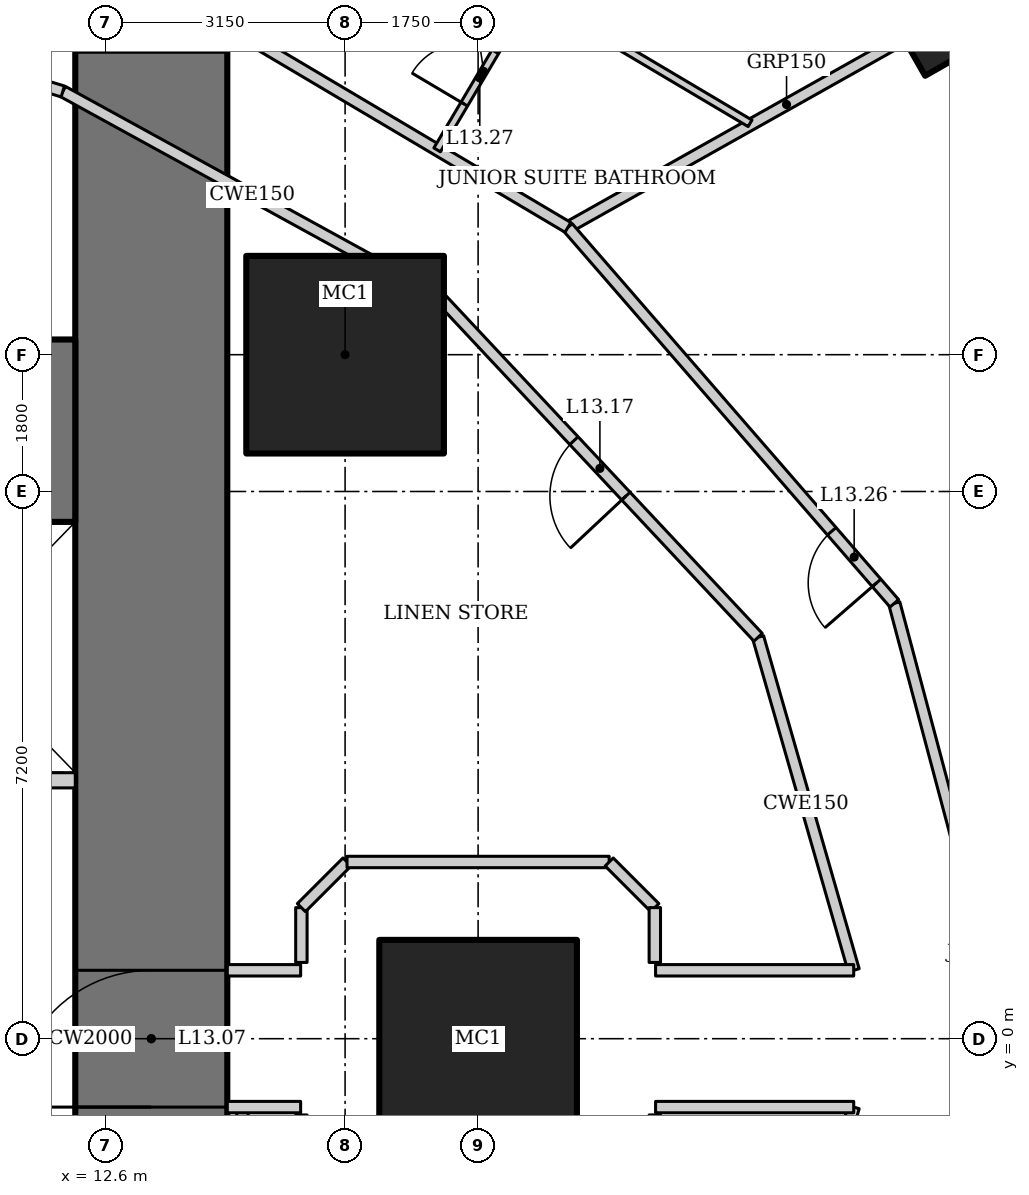
"""IFC4 building model, lengths in metres.
Left out: names, types, materials, properties, quantities, classifications, styles, units other than length and angle.
Written with IfcOpenShell. Run it as: python <this file> out.ifc"""

import sys

from ifc_helpers import new_model, si_unit, direction, frame, frame_2d, origin, origin_2d, place, context, subcontext, project, spatial, rectangle, hollow_rectangle, extrude, element, fill, save


model = new_model("IFC4")
c1 = context("Model", 3, precision=1e-05, world=origin(), true_north=direction((0.0, 1.0)))
c2 = subcontext(c1, "Body", "Model", "MODEL_VIEW")
j1 = project(units=[si_unit("LENGTHUNIT", "METRE"), si_unit("PLANEANGLEUNIT", "RADIAN")], contexts=[c1])
p1 = place(None, origin())
s1 = spatial("IfcSite", under=j1, at=p1, CompositionType="ELEMENT")
p2 = place(p1, origin())
s2 = spatial("IfcBuilding", under=s1, at=p2, CompositionType="ELEMENT")
p3 = place(p2, frame((0.0, 0.0, 62.2)))
s3 = spatial("IfcBuildingStorey", under=s2, at=p3, CompositionType="ELEMENT", Elevation=62.2)
for number, where, z_axis, x_axis in (
    (1, (17.5, 0.0, 0.0), (0.0, 0.0, 1.0), (1.0, 0.0, 0.0)),
    (2, (15.75, 9.0, 0.0), (0.0, 0.0, 1.0), (1.0, 0.0, 0.0)),
):
    element("IfcColumn", number, at=place(p3, frame(where, z_axis=z_axis, x_axis=x_axis)), inside=s3, PredefinedType="COLUMN", context=c2, shape_type="SweptSolid", body=[
        extrude(hollow_rectangle(XDim=2.6, YDim=2.6, WallThickness=0.13, at=origin_2d()), origin(), (0.0, 0.0, 1.0), 3.6),
    ])
p4 = place(p3, frame((23.605, 13.489, 0.0), z_axis=(0.0, 0.0, 1.0), x_axis=(0.86824298017, 0.496139221777, 0.0)))
e3 = element("IfcColumn", 3, at=p4, inside=s3, PredefinedType="COLUMN", context=c2, shape_type="SweptSolid", body=[
    extrude(hollow_rectangle(XDim=1.2, YDim=1.2, WallThickness=0.12, at=origin_2d()), origin(), (0.0, 0.0, 1.0), 3.6),
])
p5 = place(p3, frame((13.2, -13.0, 0.0), z_axis=(0.0, 0.0, 1.0), x_axis=(0.0, 1.0, 0.0)))
e4 = element("IfcWall", 4, at=p5, inside=s3, PredefinedType="SHEAR", context=c2, shape_type="SweptSolid", body=[
    extrude(rectangle(XDim=26.0, YDim=2.0, at=frame_2d((13.0, 0.0))), origin(), (0.0, 0.0, 1.0), 3.6),
])
p6 = place(p5, frame((12.1, 0.0, 0.0)))
e5 = element("IfcOpeningElement", 5, at=p6, cuts=e4, PredefinedType="OPENING", context=c2, shape_type="SweptSolid", body=[
    extrude(rectangle(XDim=1.8, YDim=2.1, at=frame_2d((0.9, 1.05))), frame((0.0, 1.01, 0.0), z_axis=(0.0, -1.0, 0.0), x_axis=(1.0, 0.0, 0.0)), (0.0, 0.0, 1.0), 2.02),
])
p7 = place(p3, frame((12.2, 8.0, 0.0), z_axis=(0.0, 0.0, 1.0), x_axis=(-1.0, 0.0, 0.0)))
e6 = element("IfcWall", 6, at=p7, inside=s3, PredefinedType="SHEAR", context=c2, shape_type="SweptSolid", body=[
    extrude(rectangle(XDim=24.4, YDim=2.4, at=frame_2d((12.2, 0.0))), origin(), (0.0, 0.0, 1.0), 3.6),
])
p8 = place(p3, frame((12.2, 3.4, 0.0), z_axis=(0.0, 0.0, 1.0), x_axis=(-1.0, 0.0, 0.0)))
e7 = element("IfcWall", 7, at=p8, inside=s3, PredefinedType="SOLIDWALL", context=c2, shape_type="SweptSolid", body=[
    extrude(rectangle(XDim=6.6, YDim=0.2, at=frame_2d((3.3, 0.0))), origin(), (0.0, 0.0, 1.0), 3.6),
])
p9 = place(p8, frame((4.45, 0.0, 0.0)))
e8 = element("IfcOpeningElement", 8, at=p9, cuts=e7, PredefinedType="OPENING", context=c2, shape_type="SweptSolid", body=[
    extrude(rectangle(XDim=1.1, YDim=2.2, at=frame_2d((0.55, 1.1))), frame((0.0, 0.11, 0.0), z_axis=(0.0, -1.0, 0.0), x_axis=(1.0, 0.0, 0.0)), (0.0, 0.0, 1.0), 0.22),
])
p10 = place(p8, frame((0.9, 0.0, 0.0)))
e9 = element("IfcOpeningElement", 9, at=p10, cuts=e7, PredefinedType="OPENING", context=c2, shape_type="SweptSolid", body=[
    extrude(rectangle(XDim=1.4, YDim=2.2, at=frame_2d((0.7, 1.1))), frame((0.0, 0.11, 0.0), z_axis=(0.0, -1.0, 0.0), x_axis=(1.0, 0.0, 0.0)), (0.0, 0.0, 1.0), 0.22),
])
p11 = place(p3, frame((24.435, 13.909, 0.0), z_axis=(0.0, 0.0, 1.0), x_axis=(-0.871747379892, -0.489955616001, 0.0)))
e10 = element("IfcWall", 10, at=p11, inside=s3, PredefinedType="PARTITIONING", context=c2, shape_type="SweptSolid", body=[
    extrude(rectangle(XDim=6.6, YDim=0.15, at=frame_2d((3.3, 0.0))), origin(), (0.0, 0.0, 1.0), 2.693),
])
p12 = place(p3, frame((24.5, 0.0, 0.0), z_axis=(0.0, 0.0, 1.0), x_axis=(-0.257083265334, 0.966389256296, 0.0)))
e11 = element("IfcWall", 11, at=p12, inside=s3, PredefinedType="PARTITIONING", context=c2, shape_type="SweptSolid", body=[
    extrude(rectangle(XDim=5.928, YDim=0.15, at=frame_2d((2.964, 0.0))), origin(), (0.0, 0.0, 1.0), 3.45),
])
p13 = place(p3, frame((22.976, 5.729, 0.0), z_axis=(0.0, 0.0, 1.0), x_axis=(-0.655599989166, 0.755108372491, 0.0)))
e12 = element("IfcWall", 12, at=p13, inside=s3, PredefinedType="PARTITIONING", context=c2, shape_type="SweptSolid", body=[
    extrude(rectangle(XDim=6.551, YDim=0.15, at=frame_2d((3.275, 0.0))), origin(), (0.0, 0.0, 1.0), 3.45),
])
p14 = place(p13, frame((0.356, 0.0, 0.0)))
e13 = element("IfcOpeningElement", 13, at=p14, cuts=e12, PredefinedType="OPENING", context=c2, shape_type="SweptSolid", body=[
    extrude(rectangle(XDim=0.9, YDim=2.1, at=frame_2d((0.45, 1.05))), frame((0.0, 0.085, 0.0), z_axis=(0.0, -1.0, 0.0), x_axis=(1.0, 0.0, 0.0)), (0.0, 0.0, 1.0), 0.17),
])
p15 = place(p3, frame((18.681, 10.675, 0.0), z_axis=(0.0, 0.0, 1.0), x_axis=(-0.860147339762, 0.510045639036, 0.0)))
e14 = element("IfcWall", 14, at=p15, inside=s3, PredefinedType="PARTITIONING", context=c2, shape_type="SweptSolid", body=[
    extrude(rectangle(XDim=6.19, YDim=0.15, at=frame_2d((3.095, 0.0))), origin(), (0.0, 0.0, 1.0), 3.45),
])
p16 = place(p3, frame((22.976, -5.729, 0.0), z_axis=(0.0, 0.0, 1.0), x_axis=(0.257083265334, 0.966389256296, 0.0)))
e15 = element("IfcWall", 15, at=p16, inside=s3, PredefinedType="PARTITIONING", context=c2, shape_type="SweptSolid", body=[
    extrude(rectangle(XDim=5.928, YDim=0.15, at=frame_2d((2.964, 0.0))), origin(), (0.0, 0.0, 1.0), 3.45),
])
p17 = place(p16, frame((1.794, 0.0, 0.0)))
e16 = element("IfcOpeningElement", 16, at=p17, cuts=e15, PredefinedType="OPENING", context=c2, shape_type="SweptSolid", body=[
    extrude(rectangle(XDim=0.9, YDim=2.1, at=frame_2d((0.45, 1.05))), frame((0.0, 0.085, 0.0), z_axis=(0.0, -1.0, 0.0), x_axis=(1.0, 0.0, 0.0)), (0.0, 0.0, 1.0), 0.17),
])
p18 = place(p3, frame((22.442, 0.9, 0.0), z_axis=(0.0, 0.0, 1.0), x_axis=(-0.27585972825, 0.961197903831, 0.0)))
e17 = element("IfcWall", 17, at=p18, inside=s3, PredefinedType="PARTITIONING", context=c2, shape_type="SweptSolid", body=[
    extrude(rectangle(XDim=4.559, YDim=0.15, at=frame_2d((2.279, 0.0))), origin(), (0.0, 0.0, 1.0), 3.45),
])
p19 = place(p3, frame((21.184, 5.282, 0.0), z_axis=(0.0, 0.0, 1.0), x_axis=(-0.68365836236, 0.729802194828, 0.0)))
e18 = element("IfcWall", 18, at=p19, inside=s3, PredefinedType="PARTITIONING", context=c2, shape_type="SweptSolid", body=[
    extrude(rectangle(XDim=6.09, YDim=0.15, at=frame_2d((3.045, 0.0))), origin(), (0.0, 0.0, 1.0), 3.45),
])
p20 = place(p19, frame((2.545, 0.0, 0.0)))
e19 = element("IfcOpeningElement", 19, at=p20, cuts=e18, PredefinedType="OPENING", context=c2, shape_type="SweptSolid", body=[
    extrude(rectangle(XDim=1.0, YDim=2.1, at=frame_2d((0.5, 1.05))), frame((0.0, 0.085, 0.0), z_axis=(0.0, -1.0, 0.0), x_axis=(1.0, 0.0, 0.0)), (0.0, 0.0, 1.0), 0.17),
])
p21 = place(p3, frame((17.021, 9.726, 0.0), z_axis=(0.0, 0.0, 1.0), x_axis=(-0.876522084062, 0.481361647986, 0.0)))
e20 = element("IfcWall", 20, at=p21, inside=s3, PredefinedType="PARTITIONING", context=c2, shape_type="SweptSolid", body=[
    extrude(rectangle(XDim=5.687, YDim=0.15, at=frame_2d((2.844, 0.0))), origin(), (0.0, 0.0, 1.0), 3.45),
])
p22 = place(p3, frame((12.036, 12.464, 0.0), z_axis=(0.0, 0.0, 1.0), x_axis=(-0.956795045135, 0.290763205385, 0.0)))
e21 = element("IfcWall", 21, at=p22, inside=s3, PredefinedType="PARTITIONING", context=c2, shape_type="SweptSolid", body=[
    extrude(rectangle(XDim=5.146, YDim=0.15, at=frame_2d((2.573, 0.0))), origin(), (0.0, 0.0, 1.0), 3.45),
])
p23 = place(p22, frame((0.816, 0.0, 0.0)))
e22 = element("IfcOpeningElement", 22, at=p23, cuts=e21, PredefinedType="OPENING", context=c2, shape_type="SweptSolid", body=[
    extrude(rectangle(XDim=0.9, YDim=2.1, at=frame_2d((0.45, 1.05))), frame((0.0, 0.085, 0.0), z_axis=(0.0, -1.0, 0.0), x_axis=(1.0, 0.0, 0.0)), (0.0, 0.0, 1.0), 0.17),
])
p24 = place(p3, frame((21.184, -5.282, 0.0), z_axis=(0.0, 0.0, 1.0), x_axis=(0.27585972825, 0.961197903831, 0.0)))
e23 = element("IfcWall", 23, at=p24, inside=s3, PredefinedType="PARTITIONING", context=c2, shape_type="SweptSolid", body=[
    extrude(rectangle(XDim=4.559, YDim=0.15, at=frame_2d((2.279, 0.0))), origin(), (0.0, 0.0, 1.0), 3.45),
])
p25 = place(p3, frame((14.4, -11.017, 0.0), z_axis=(0.0, 0.0, 1.0), x_axis=(0.0, 1.0, 0.0)))
e24 = element("IfcWall", 24, at=p25, inside=s3, PredefinedType="PARTITIONING", context=c2, shape_type="SweptSolid", body=[
    extrude(rectangle(XDim=10.117, YDim=0.15, at=frame_2d((5.059, 0.0))), origin(), (0.0, 0.0, 1.0), 3.45),
])
p26 = place(p3, frame((16.961, 11.695, 0.0), z_axis=(0.0, 0.0, 1.0), x_axis=(0.510075642074, 0.860129548012, 0.0)))
e25 = element("IfcWall", 25, at=p26, inside=s3, PredefinedType="PARTITIONING", context=c2, shape_type="SweptSolid", body=[
    extrude(rectangle(XDim=2.4, YDim=0.1, at=frame_2d((1.2, 0.0))), origin(), (0.0, 0.0, 1.0), 3.45),
])
p27 = place(p26, frame((0.7, 0.0, 0.0)))
e26 = element("IfcOpeningElement", 26, at=p27, cuts=e25, PredefinedType="OPENING", context=c2, shape_type="SweptSolid", body=[
    extrude(rectangle(XDim=0.8, YDim=2.1, at=frame_2d((0.4, 1.05))), frame((0.0, 0.06, 0.0), z_axis=(0.0, -1.0, 0.0), x_axis=(1.0, 0.0, 0.0)), (0.0, 0.0, 1.0), 0.12),
])
p28 = place(p3, frame((18.185, 13.76, 0.0), z_axis=(0.0, 0.0, 1.0), x_axis=(0.860146437071, -0.510047161343, 0.0)))
e27 = element("IfcWall", 27, at=p28, inside=s3, PredefinedType="PARTITIONING", context=c2, shape_type="SweptSolid", body=[
    extrude(rectangle(XDim=3.363, YDim=0.1, at=frame_2d((1.681, 0.0))), origin(), (0.0, 0.0, 1.0), 3.45),
])
p29 = place(p3, frame((14.2, -0.9, 0.0), z_axis=(0.0, 0.0, 1.0), x_axis=(1.0, 0.0, 0.0)))
e28 = element("IfcWall", 28, at=p29, inside=s3, PredefinedType="PARTITIONING", context=c2, shape_type="SweptSolid", body=[
    extrude(rectangle(XDim=0.965, YDim=0.15, at=frame_2d((0.482, 0.0))), origin(), (0.0, 0.0, 1.0), 3.45),
])
p30 = place(p3, frame((19.835, -0.9, 0.0), z_axis=(0.0, 0.0, 1.0), x_axis=(1.0, 0.0, 0.0)))
e29 = element("IfcWall", 29, at=p30, inside=s3, PredefinedType="PARTITIONING", context=c2, shape_type="SweptSolid", body=[
    extrude(rectangle(XDim=2.607, YDim=0.15, at=frame_2d((1.303, 0.0))), origin(), (0.0, 0.0, 1.0), 3.45),
])
p31 = place(p3, frame((14.2, 0.9, 0.0), z_axis=(0.0, 0.0, 1.0), x_axis=(1.0, 0.0, 0.0)))
e30 = element("IfcWall", 30, at=p31, inside=s3, PredefinedType="PARTITIONING", context=c2, shape_type="SweptSolid", body=[
    extrude(rectangle(XDim=0.965, YDim=0.15, at=frame_2d((0.482, 0.0))), origin(), (0.0, 0.0, 1.0), 3.45),
])
p32 = place(p3, frame((19.835, 0.9, 0.0), z_axis=(0.0, 0.0, 1.0), x_axis=(1.0, 0.0, 0.0)))
e31 = element("IfcWall", 31, at=p32, inside=s3, PredefinedType="PARTITIONING", context=c2, shape_type="SweptSolid", body=[
    extrude(rectangle(XDim=2.607, YDim=0.15, at=frame_2d((1.303, 0.0))), origin(), (0.0, 0.0, 1.0), 3.45),
])
p33 = place(p3, frame((15.175, 1.003, 0.0), z_axis=(0.0, 0.0, 1.0), x_axis=(0.0, 1.0, 0.0)))
e32 = element("IfcWall", 32, at=p33, inside=s3, PredefinedType="PARTITIONING", context=c2, shape_type="SweptSolid", body=[
    extrude(rectangle(XDim=0.721, YDim=0.15, at=frame_2d((0.361, 0.0))), origin(), (0.0, 0.0, 1.0), 3.45),
])
p34 = place(p3, frame((15.175, 1.725, 0.0), z_axis=(0.0, 0.0, 1.0), x_axis=(0.707106781187, 0.707106781187, 0.0)))
e33 = element("IfcWall", 33, at=p34, inside=s3, PredefinedType="PARTITIONING", context=c2, shape_type="SweptSolid", body=[
    extrude(rectangle(XDim=0.849, YDim=0.15, at=frame_2d((0.425, 0.0))), origin(), (0.0, 0.0, 1.0), 3.45),
])
p35 = place(p3, frame((15.775, 2.325, 0.0), z_axis=(0.0, 0.0, 1.0), x_axis=(1.0, 0.0, 0.0)))
e34 = element("IfcWall", 34, at=p35, inside=s3, PredefinedType="PARTITIONING", context=c2, shape_type="SweptSolid", body=[
    extrude(rectangle(XDim=3.449, YDim=0.15, at=frame_2d((1.725, 0.0))), origin(), (0.0, 0.0, 1.0), 3.45),
])
p36 = place(p3, frame((19.225, 2.325, 0.0), z_axis=(0.0, 0.0, 1.0), x_axis=(0.707106781187, -0.707106781187, 0.0)))
e35 = element("IfcWall", 35, at=p36, inside=s3, PredefinedType="PARTITIONING", context=c2, shape_type="SweptSolid", body=[
    extrude(rectangle(XDim=0.849, YDim=0.15, at=frame_2d((0.425, 0.0))), origin(), (0.0, 0.0, 1.0), 3.45),
])
p37 = place(p3, frame((19.825, 1.725, 0.0), z_axis=(0.0, 0.0, 1.0), x_axis=(0.0, -1.0, 0.0)))
e36 = element("IfcWall", 36, at=p37, inside=s3, PredefinedType="PARTITIONING", context=c2, shape_type="SweptSolid", body=[
    extrude(rectangle(XDim=0.721, YDim=0.15, at=frame_2d((0.361, 0.0))), origin(), (0.0, 0.0, 1.0), 3.45),
])
p38 = place(p6, origin())
e37 = element("IfcDoor", 37, at=p38, inside=s3, OperationType="DOUBLE_DOOR_DOUBLE_SWING", PredefinedType="DOOR", context=c2, shape_type="SweptSolid", body=[
    extrude(rectangle(XDim=1.8, YDim=2.1, at=frame_2d((0.9, 1.05))), frame((0.0, 0.025, 0.0), z_axis=(0.0, -1.0, 0.0), x_axis=(1.0, 0.0, 0.0)), (0.0, 0.0, 1.0), 0.05),
])
fill(e5, e37)
p39 = place(p20, origin())
e38 = element("IfcDoor", 38, at=p39, inside=s3, OperationType="SINGLE_SWING_LEFT", PredefinedType="DOOR", context=c2, shape_type="SweptSolid", body=[
    extrude(rectangle(XDim=1.0, YDim=2.1, at=frame_2d((0.5, 1.05))), frame((0.0, 0.025, 0.0), z_axis=(0.0, -1.0, 0.0), x_axis=(1.0, 0.0, 0.0)), (0.0, 0.0, 1.0), 0.05),
])
fill(e19, e38)
p40 = place(p14, origin())
e39 = element("IfcDoor", 39, at=p40, inside=s3, OperationType="SINGLE_SWING_LEFT", PredefinedType="DOOR", context=c2, shape_type="SweptSolid", body=[
    extrude(rectangle(XDim=0.9, YDim=2.1, at=frame_2d((0.45, 1.05))), frame((0.0, 0.025, 0.0), z_axis=(0.0, -1.0, 0.0), x_axis=(1.0, 0.0, 0.0)), (0.0, 0.0, 1.0), 0.05),
])
fill(e13, e39)
p41 = place(p27, origin())
e40 = element("IfcDoor", 40, at=p41, inside=s3, OperationType="SINGLE_SWING_LEFT", PredefinedType="DOOR", context=c2, shape_type="SweptSolid", body=[
    extrude(rectangle(XDim=0.8, YDim=2.1, at=frame_2d((0.4, 1.05))), frame((0.0, 0.025, 0.0), z_axis=(0.0, -1.0, 0.0), x_axis=(1.0, 0.0, 0.0)), (0.0, 0.0, 1.0), 0.05),
])
fill(e26, e40)
save(model, sys.argv[1])
